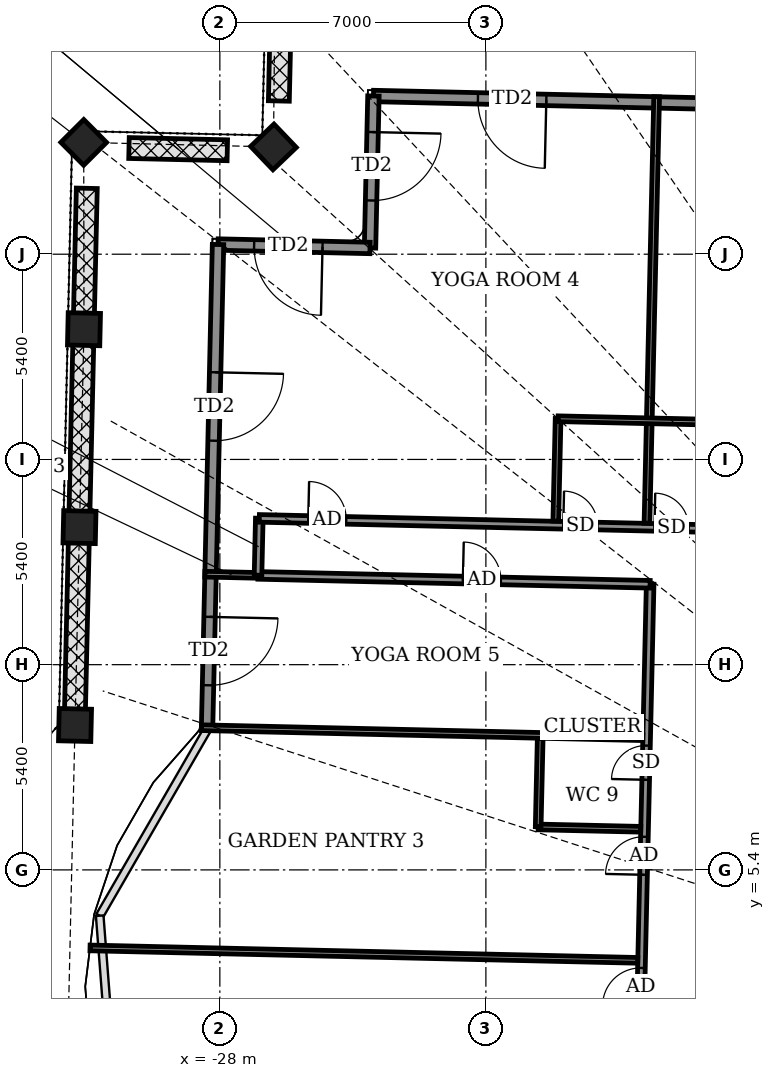
"""IFC4 building model, lengths in metres.
Left out: names, types, materials, properties, quantities, classifications, styles, units other than length and angle.
Written with IfcOpenShell. Run it as: python <this file> out.ifc"""

import sys

from ifc_helpers import new_model, si_unit, direction, frame, frame_2d, origin, origin_2d, place, context, subcontext, project, spatial, rectangle, extrude, element, fill, save


model = new_model("IFC4")
c1 = context("Model", 3, precision=1e-05, world=origin(), true_north=direction((0.0, 1.0)))
c2 = subcontext(c1, "Body", "Model", "MODEL_VIEW")
j1 = project(units=[si_unit("LENGTHUNIT", "METRE"), si_unit("PLANEANGLEUNIT", "RADIAN")], contexts=[c1])
p1 = place(None, origin())
s1 = spatial("IfcSite", under=j1, at=p1, CompositionType="ELEMENT")
p2 = place(p1, origin())
s2 = spatial("IfcBuilding", under=s1, at=p2, CompositionType="ELEMENT")
p3 = place(p2, frame((0.0, 0.0, 329.7)))
s3 = spatial("IfcBuildingStorey", under=s2, at=p3, CompositionType="ELEMENT", Elevation=329.7)
for number, where, z_axis, x_axis in (
    (1, (-26.589, 24.423, -0.55), (0.0, 0.0, 1.0), (-0.723, -0.691, 0.0)),
    (2, (-31.582, 24.542, -0.55), (0.0, 0.0, 1.0), (-0.709, -0.706, 0.0)),
    (3, (-31.575, 19.626, -0.55), (0.0, 0.0, 1.0), (-0.023, -1.0, 0.0)),
    (4, (-31.693, 14.419, -0.55), (0.0, 0.0, 1.0), (-0.023, -1.0, 0.0)),
    (5, (-31.811, 9.212, -0.55), (0.0, 0.0, 1.0), (-0.023, -1.0, 0.0)),
):
    element("IfcColumn", number, at=place(p3, frame(where, z_axis=z_axis, x_axis=x_axis)), inside=s3, PredefinedType="COLUMN", context=c2, shape_type="SweptSolid", body=[
        extrude(rectangle(XDim=0.85, YDim=0.85, at=origin_2d()), origin(), (0.0, 0.0, 1.0), 4.6),
    ])
p4 = place(p3, frame((23.279, 24.691, 0.0), z_axis=(0.0, 0.0, 1.0), x_axis=(-0.9997425899, 0.022688189451, 0.0)))
e6 = element("IfcWall", 6, at=p4, inside=s3, PredefinedType="SOLIDWALL", context=c2, shape_type="SweptSolid", body=[
    extrude(rectangle(XDim=47.25, YDim=0.3, at=frame_2d((23.625, 0.0))), origin(), (0.0, 0.0, 1.0), 2.1),
])
p5 = place(p4, frame((3.2, 0.0, 0.0)))
e7 = element("IfcOpeningElement", 7, at=p5, cuts=e6, PredefinedType="OPENING", context=c2, shape_type="SweptSolid", body=[
    extrude(rectangle(XDim=1.8, YDim=2.0, at=frame_2d((0.9, 1.0))), frame((0.0, 0.16, 0.0), z_axis=(0.0, -1.0, 0.0), x_axis=(1.0, 0.0, 0.0)), (0.0, 0.0, 1.0), 0.32),
])
p6 = place(p4, frame((10.45, 0.0, 0.0)))
e8 = element("IfcOpeningElement", 8, at=p6, cuts=e6, PredefinedType="OPENING", context=c2, shape_type="SweptSolid", body=[
    extrude(rectangle(XDim=1.8, YDim=2.0, at=frame_2d((0.9, 1.0))), frame((0.0, 0.16, 0.0), z_axis=(0.0, -1.0, 0.0), x_axis=(1.0, 0.0, 0.0)), (0.0, 0.0, 1.0), 0.32),
])
p7 = place(p4, frame((17.7, 0.0, 0.0)))
e9 = element("IfcOpeningElement", 9, at=p7, cuts=e6, PredefinedType="OPENING", context=c2, shape_type="SweptSolid", body=[
    extrude(rectangle(XDim=1.8, YDim=2.0, at=frame_2d((0.9, 1.0))), frame((0.0, 0.16, 0.0), z_axis=(0.0, -1.0, 0.0), x_axis=(1.0, 0.0, 0.0)), (0.0, 0.0, 1.0), 0.32),
])
p8 = place(p4, frame((28.3, 0.0, 0.0)))
e10 = element("IfcOpeningElement", 10, at=p8, cuts=e6, PredefinedType="OPENING", context=c2, shape_type="SweptSolid", body=[
    extrude(rectangle(XDim=1.8, YDim=2.0, at=frame_2d((0.9, 1.0))), frame((0.0, 0.16, 0.0), z_axis=(0.0, -1.0, 0.0), x_axis=(1.0, 0.0, 0.0)), (0.0, 0.0, 1.0), 0.32),
])
p9 = place(p4, frame((35.125, 0.0, 0.0)))
e11 = element("IfcOpeningElement", 11, at=p9, cuts=e6, PredefinedType="OPENING", context=c2, shape_type="SweptSolid", body=[
    extrude(rectangle(XDim=1.8, YDim=2.0, at=frame_2d((0.9, 1.0))), frame((0.0, 0.16, 0.0), z_axis=(0.0, -1.0, 0.0), x_axis=(1.0, 0.0, 0.0)), (0.0, 0.0, 1.0), 0.32),
])
p10 = place(p4, frame((42.7, 0.0, 0.0)))
e12 = element("IfcOpeningElement", 12, at=p10, cuts=e6, PredefinedType="OPENING", context=c2, shape_type="SweptSolid", body=[
    extrude(rectangle(XDim=1.8, YDim=2.0, at=frame_2d((0.9, 1.0))), frame((0.0, 0.16, 0.0), z_axis=(0.0, -1.0, 0.0), x_axis=(1.0, 0.0, 0.0)), (0.0, 0.0, 1.0), 0.32),
])
p11 = place(p3, frame((-23.959, 25.763, 0.0), z_axis=(0.0, 0.0, 1.0), x_axis=(-0.022521758502, -0.999746353029, 0.0)))
e13 = element("IfcWall", 13, at=p11, inside=s3, PredefinedType="SOLIDWALL", context=c2, shape_type="SweptSolid", body=[
    extrude(rectangle(XDim=4.0, YDim=0.3, at=frame_2d((2.0, 0.0))), origin(), (0.0, 0.0, 1.0), 2.1),
])
p12 = place(p11, frame((0.95, 0.0, 0.0)))
e14 = element("IfcOpeningElement", 14, at=p12, cuts=e13, PredefinedType="OPENING", context=c2, shape_type="SweptSolid", body=[
    extrude(rectangle(XDim=1.8, YDim=2.0, at=frame_2d((0.9, 1.0))), frame((0.0, 0.16, 0.0), z_axis=(0.0, -1.0, 0.0), x_axis=(1.0, 0.0, 0.0)), (0.0, 0.0, 1.0), 0.32),
])
p13 = place(p3, frame((-24.049, 21.764, 0.0), z_axis=(0.0, 0.0, 1.0), x_axis=(-0.999740826251, 0.022765770952, 0.0)))
e15 = element("IfcWall", 15, at=p13, inside=s3, PredefinedType="SOLIDWALL", context=c2, shape_type="SweptSolid", body=[
    extrude(rectangle(XDim=4.0, YDim=0.3, at=frame_2d((2.0, 0.0))), origin(), (0.0, 0.0, 1.0), 2.1),
])
p14 = place(p13, frame((1.25, 0.0, 0.0)))
e16 = element("IfcOpeningElement", 16, at=p14, cuts=e15, PredefinedType="OPENING", context=c2, shape_type="SweptSolid", body=[
    extrude(rectangle(XDim=1.8, YDim=2.0, at=frame_2d((0.9, 1.0))), frame((0.0, 0.16, 0.0), z_axis=(0.0, -1.0, 0.0), x_axis=(1.0, 0.0, 0.0)), (0.0, 0.0, 1.0), 0.32),
])
p15 = place(p3, frame((-28.048, 21.855, 0.0), z_axis=(0.0, 0.0, 1.0), x_axis=(-0.022677140298, -0.999742840588, 0.0)))
e17 = element("IfcWall", 17, at=p15, inside=s3, PredefinedType="SOLIDWALL", context=c2, shape_type="SweptSolid", body=[
    extrude(rectangle(XDim=12.779, YDim=0.3, at=frame_2d((6.39, 0.0))), origin(), (0.0, 0.0, 1.0), 2.1),
])
p16 = place(p15, frame((3.363, 0.0, 0.0)))
e18 = element("IfcOpeningElement", 18, at=p16, cuts=e17, PredefinedType="OPENING", context=c2, shape_type="SweptSolid", body=[
    extrude(rectangle(XDim=1.8, YDim=2.0, at=frame_2d((0.9, 1.0))), frame((0.0, 0.16, 0.0), z_axis=(0.0, -1.0, 0.0), x_axis=(1.0, 0.0, 0.0)), (0.0, 0.0, 1.0), 0.32),
])
p17 = place(p15, frame((9.8, 0.0, 0.0)))
e19 = element("IfcOpeningElement", 19, at=p17, cuts=e17, PredefinedType="OPENING", context=c2, shape_type="SweptSolid", body=[
    extrude(rectangle(XDim=1.8, YDim=2.0, at=frame_2d((0.9, 1.0))), frame((0.0, 0.16, 0.0), z_axis=(0.0, -1.0, 0.0), x_axis=(1.0, 0.0, 0.0)), (0.0, 0.0, 1.0), 0.32),
])
p18 = place(p3, frame((-31.813, 9.575, 0.0), z_axis=(0.0, 0.0, 1.0), x_axis=(0.022671035137, 0.999742979053, 0.0)))
e20 = element("IfcWall", 20, at=p18, inside=s3, PredefinedType="USERDEFINED", context=c2, shape_type="SweptSolid", body=[
    extrude(rectangle(XDim=13.762, YDim=0.55, at=frame_2d((6.881, 0.0))), origin(), (0.0, 0.0, 1.0), 0.8),
])
p19 = place(p3, frame((-30.391, 24.394, 0.0), z_axis=(0.0, 0.0, 1.0), x_axis=(0.999739345612, -0.022830699409, 0.0)))
e21 = element("IfcWall", 21, at=p19, inside=s3, PredefinedType="USERDEFINED", context=c2, shape_type="SweptSolid", body=[
    extrude(rectangle(XDim=2.588, YDim=0.55, at=frame_2d((1.294, 0.0))), origin(), (0.0, 0.0, 1.0), 0.8),
])
p20 = place(p3, frame((-26.448, 25.632, 0.0), z_axis=(0.0, 0.0, 1.0), x_axis=(0.022898430909, 0.999737796556, 0.0)))
e22 = element("IfcWall", 22, at=p20, inside=s3, PredefinedType="USERDEFINED", context=c2, shape_type="SweptSolid", body=[
    extrude(rectangle(XDim=2.538, YDim=0.55, at=frame_2d((1.269, 0.0))), origin(), (0.0, 0.0, 1.0), 0.8),
])
p21 = place(p3, frame((-17.247, -12.149, 0.0), z_axis=(0.0, 0.0, 1.0), x_axis=(0.022696191528, 0.999742408268, 0.0)))
e23 = element("IfcWall", 23, at=p21, inside=s3, PredefinedType="PARTITIONING", context=c2, shape_type="SweptSolid", body=[
    extrude(rectangle(XDim=25.074, YDim=0.2, at=frame_2d((12.537, 0.0))), origin(), (0.0, 0.0, 1.0), 2.1),
])
p22 = place(p21, frame((17.425, 0.0, 0.0)))
e24 = element("IfcOpeningElement", 24, at=p22, cuts=e23, PredefinedType="OPENING", context=c2, shape_type="SweptSolid", body=[
    extrude(rectangle(XDim=1.0, YDim=2.1, at=frame_2d((0.5, 1.05))), frame((0.0, 0.11, 0.0), z_axis=(0.0, -1.0, 0.0), x_axis=(1.0, 0.0, 0.0)), (0.0, 0.0, 1.0), 0.22),
])
p23 = place(p21, frame((19.925, 0.0, 0.0)))
e25 = element("IfcOpeningElement", 25, at=p23, cuts=e23, PredefinedType="OPENING", context=c2, shape_type="SweptSolid", body=[
    extrude(rectangle(XDim=0.9, YDim=2.1, at=frame_2d((0.45, 1.05))), frame((0.0, 0.11, 0.0), z_axis=(0.0, -1.0, 0.0), x_axis=(1.0, 0.0, 0.0)), (0.0, 0.0, 1.0), 0.22),
])
p24 = place(p21, frame((13.973, 0.0, 0.0)))
e26 = element("IfcOpeningElement", 26, at=p24, cuts=e23, PredefinedType="OPENING", context=c2, shape_type="SweptSolid", body=[
    extrude(rectangle(XDim=1.0, YDim=2.1, at=frame_2d((0.5, 1.05))), frame((0.0, 0.11, 0.0), z_axis=(0.0, -1.0, 0.0), x_axis=(1.0, 0.0, 0.0)), (0.0, 0.0, 1.0), 0.22),
])
p25 = place(p21, frame((8.575, 0.0, 0.0)))
e27 = element("IfcOpeningElement", 27, at=p25, cuts=e23, PredefinedType="OPENING", context=c2, shape_type="SweptSolid", body=[
    extrude(rectangle(XDim=0.9, YDim=2.1, at=frame_2d((0.45, 1.05))), frame((0.0, 0.11, 0.0), z_axis=(0.0, -1.0, 0.0), x_axis=(1.0, 0.0, 0.0)), (0.0, 0.0, 1.0), 0.22),
])
p26 = place(p21, frame((6.175, 0.0, 0.0)))
e28 = element("IfcOpeningElement", 28, at=p26, cuts=e23, PredefinedType="OPENING", context=c2, shape_type="SweptSolid", body=[
    extrude(rectangle(XDim=0.9, YDim=2.1, at=frame_2d((0.45, 1.05))), frame((0.0, 0.11, 0.0), z_axis=(0.0, -1.0, 0.0), x_axis=(1.0, 0.0, 0.0)), (0.0, 0.0, 1.0), 0.22),
])
p27 = place(p3, frame((-31.416, 3.347, 0.0), z_axis=(0.0, 0.0, 1.0), x_axis=(0.999742848762, -0.022676779958, 0.0)))
e29 = element("IfcWall", 29, at=p27, inside=s3, PredefinedType="PARTITIONING", context=c2, shape_type="SweptSolid", body=[
    extrude(rectangle(XDim=14.416, YDim=0.15, at=frame_2d((7.208, 0.0))), origin(), (0.0, 0.0, 1.0), 2.55),
])
p28 = place(p3, frame((-19.625, 6.53, 0.0), z_axis=(0.0, 0.0, 1.0), x_axis=(0.999744396973, -0.02260842146, 0.0)))
e30 = element("IfcWall", 30, at=p28, inside=s3, PredefinedType="PARTITIONING", context=c2, shape_type="SweptSolid", body=[
    extrude(rectangle(XDim=2.7, YDim=0.15, at=frame_2d((1.35, 0.0))), origin(), (0.0, 0.0, 1.0), 2.25),
])
p29 = place(p3, frame((-19.624, 6.535, 0.0), z_axis=(0.0, 0.0, 1.0), x_axis=(0.022778632478, 0.99974053329, 0.0)))
e31 = element("IfcWall", 31, at=p29, inside=s3, PredefinedType="PARTITIONING", context=c2, shape_type="SweptSolid", body=[
    extrude(rectangle(XDim=2.326, YDim=0.15, at=frame_2d((1.163, 0.0))), origin(), (0.0, 0.0, 1.0), 2.25),
])
p30 = place(p3, frame((-28.487, 9.142, 0.0), z_axis=(0.0, 0.0, 1.0), x_axis=(0.999741520862, -0.02273524718, 0.0)))
e32 = element("IfcWall", 32, at=p30, inside=s3, PredefinedType="PARTITIONING", context=c2, shape_type="SweptSolid", body=[
    extrude(rectangle(XDim=11.619, YDim=0.15, at=frame_2d((5.81, 0.0))), origin(), (0.0, 0.0, 1.0), 2.15),
])
p31 = place(p3, frame((-28.395, 13.181, 0.0), z_axis=(0.0, 0.0, 1.0), x_axis=(0.999740306547, -0.022788581896, 0.0)))
e33 = element("IfcWall", 33, at=p31, inside=s3, PredefinedType="PARTITIONING", context=c2, shape_type="SweptSolid", body=[
    extrude(rectangle(XDim=1.403, YDim=0.15, at=frame_2d((0.702, 0.0))), origin(), (0.0, 0.0, 1.0), 4.05),
])
p32 = place(p3, frame((-26.996, 13.149, 0.0), z_axis=(0.0, 0.0, 1.0), x_axis=(0.999743140734, -0.022663904229, 0.0)))
e34 = element("IfcWall", 34, at=p32, inside=s3, PredefinedType="PARTITIONING", context=c2, shape_type="SweptSolid", body=[
    extrude(rectangle(XDim=10.32, YDim=0.2, at=frame_2d((5.16, 0.0))), origin(), (0.0, 0.0, 1.0), 2.1),
])
p33 = place(p32, frame((5.392, 0.0, 0.0)))
e35 = element("IfcOpeningElement", 35, at=p33, cuts=e34, PredefinedType="OPENING", context=c2, shape_type="SweptSolid", body=[
    extrude(rectangle(XDim=1.0, YDim=2.1, at=frame_2d((0.5, 1.05))), frame((0.0, 0.11, 0.0), z_axis=(0.0, -1.0, 0.0), x_axis=(1.0, 0.0, 0.0)), (0.0, 0.0, 1.0), 0.22),
])
p34 = place(p3, frame((-26.996, 13.153, 0.0), z_axis=(0.0, 0.0, 1.0), x_axis=(0.022780545013, 0.999740489712, 0.0)))
e36 = element("IfcWall", 36, at=p34, inside=s3, PredefinedType="PARTITIONING", context=c2, shape_type="SweptSolid", body=[
    extrude(rectangle(XDim=1.5, YDim=0.2, at=frame_2d((0.75, 0.0))), origin(), (0.0, 0.0, 1.0), 2.15),
])
p35 = place(p3, frame((-26.962, 14.649, 0.0), z_axis=(0.0, 0.0, 1.0), x_axis=(0.999742499365, -0.022692178484, 0.0)))
e37 = element("IfcWall", 37, at=p35, inside=s3, PredefinedType="PARTITIONING", context=c2, shape_type="SweptSolid", body=[
    extrude(rectangle(XDim=52.75, YDim=0.2, at=frame_2d((26.375, 0.0))), origin(), (0.0, 0.0, 1.0), 2.1),
])
p36 = place(p35, frame((47.426, 0.0, 0.0)))
e38 = element("IfcOpeningElement", 38, at=p36, cuts=e37, PredefinedType="OPENING", context=c2, shape_type="SweptSolid", body=[
    extrude(rectangle(XDim=1.0, YDim=2.1, at=frame_2d((0.5, 1.05))), frame((0.0, 0.11, 0.0), z_axis=(0.0, -1.0, 0.0), x_axis=(1.0, 0.0, 0.0)), (0.0, 0.0, 1.0), 0.22),
])
p37 = place(p35, frame((41.85, 0.0, 0.0)))
e39 = element("IfcOpeningElement", 39, at=p37, cuts=e37, PredefinedType="OPENING", context=c2, shape_type="SweptSolid", body=[
    extrude(rectangle(XDim=0.9, YDim=2.1, at=frame_2d((0.45, 1.05))), frame((0.0, 0.11, 0.0), z_axis=(0.0, -1.0, 0.0), x_axis=(1.0, 0.0, 0.0)), (0.0, 0.0, 1.0), 0.22),
])
p38 = place(p35, frame((36.824, 0.0, 0.0)))
e40 = element("IfcOpeningElement", 40, at=p38, cuts=e37, PredefinedType="OPENING", context=c2, shape_type="SweptSolid", body=[
    extrude(rectangle(XDim=1.0, YDim=2.1, at=frame_2d((0.5, 1.05))), frame((0.0, 0.11, 0.0), z_axis=(0.0, -1.0, 0.0), x_axis=(1.0, 0.0, 0.0)), (0.0, 0.0, 1.0), 0.22),
])
p39 = place(p35, frame((28.436, 0.0, 0.0)))
e41 = element("IfcOpeningElement", 41, at=p39, cuts=e37, PredefinedType="OPENING", context=c2, shape_type="SweptSolid", body=[
    extrude(rectangle(XDim=1.0, YDim=2.1, at=frame_2d((0.5, 1.05))), frame((0.0, 0.11, 0.0), z_axis=(0.0, -1.0, 0.0), x_axis=(1.0, 0.0, 0.0)), (0.0, 0.0, 1.0), 0.22),
])
p40 = place(p35, frame((33.45, 0.0, 0.0)))
e42 = element("IfcOpeningElement", 42, at=p40, cuts=e37, PredefinedType="OPENING", context=c2, shape_type="SweptSolid", body=[
    extrude(rectangle(XDim=0.9, YDim=2.1, at=frame_2d((0.45, 1.05))), frame((0.0, 0.11, 0.0), z_axis=(0.0, -1.0, 0.0), x_axis=(1.0, 0.0, 0.0)), (0.0, 0.0, 1.0), 0.22),
])
p41 = place(p35, frame((24.05, 0.0, 0.0)))
e43 = element("IfcOpeningElement", 43, at=p41, cuts=e37, PredefinedType="OPENING", context=c2, shape_type="SweptSolid", body=[
    extrude(rectangle(XDim=1.0, YDim=2.1, at=frame_2d((0.5, 1.05))), frame((0.0, 0.11, 0.0), z_axis=(0.0, -1.0, 0.0), x_axis=(1.0, 0.0, 0.0)), (0.0, 0.0, 1.0), 0.22),
])
p42 = place(p35, frame((17.95, 0.0, 0.0)))
e44 = element("IfcOpeningElement", 44, at=p42, cuts=e37, PredefinedType="OPENING", context=c2, shape_type="SweptSolid", body=[
    extrude(rectangle(XDim=1.0, YDim=2.1, at=frame_2d((0.5, 1.05))), frame((0.0, 0.11, 0.0), z_axis=(0.0, -1.0, 0.0), x_axis=(1.0, 0.0, 0.0)), (0.0, 0.0, 1.0), 0.22),
])
p43 = place(p35, frame((21.65, 0.0, 0.0)))
e45 = element("IfcOpeningElement", 45, at=p43, cuts=e37, PredefinedType="OPENING", context=c2, shape_type="SweptSolid", body=[
    extrude(rectangle(XDim=0.9, YDim=2.1, at=frame_2d((0.45, 1.05))), frame((0.0, 0.11, 0.0), z_axis=(0.0, -1.0, 0.0), x_axis=(1.0, 0.0, 0.0)), (0.0, 0.0, 1.0), 0.22),
])
p44 = place(p35, frame((13.314, 0.0, 0.0)))
e46 = element("IfcOpeningElement", 46, at=p44, cuts=e37, PredefinedType="OPENING", context=c2, shape_type="SweptSolid", body=[
    extrude(rectangle(XDim=1.0, YDim=2.1, at=frame_2d((0.5, 1.05))), frame((0.0, 0.11, 0.0), z_axis=(0.0, -1.0, 0.0), x_axis=(1.0, 0.0, 0.0)), (0.0, 0.0, 1.0), 0.22),
])
p45 = place(p35, frame((10.4, 0.0, 0.0)))
e47 = element("IfcOpeningElement", 47, at=p45, cuts=e37, PredefinedType="OPENING", context=c2, shape_type="SweptSolid", body=[
    extrude(rectangle(XDim=0.9, YDim=2.1, at=frame_2d((0.45, 1.05))), frame((0.0, 0.11, 0.0), z_axis=(0.0, -1.0, 0.0), x_axis=(1.0, 0.0, 0.0)), (0.0, 0.0, 1.0), 0.22),
])
p46 = place(p35, frame((1.288, 0.0, 0.0)))
e48 = element("IfcOpeningElement", 48, at=p46, cuts=e37, PredefinedType="OPENING", context=c2, shape_type="SweptSolid", body=[
    extrude(rectangle(XDim=1.0, YDim=2.1, at=frame_2d((0.5, 1.05))), frame((0.0, 0.11, 0.0), z_axis=(0.0, -1.0, 0.0), x_axis=(1.0, 0.0, 0.0)), (0.0, 0.0, 1.0), 0.22),
])
p47 = place(p35, frame((8.0, 0.0, 0.0)))
e49 = element("IfcOpeningElement", 49, at=p47, cuts=e37, PredefinedType="OPENING", context=c2, shape_type="SweptSolid", body=[
    extrude(rectangle(XDim=0.9, YDim=2.1, at=frame_2d((0.45, 1.05))), frame((0.0, 0.11, 0.0), z_axis=(0.0, -1.0, 0.0), x_axis=(1.0, 0.0, 0.0)), (0.0, 0.0, 1.0), 0.22),
])
p48 = place(p3, frame((-19.161, 14.576, 0.0), z_axis=(0.0, 0.0, 1.0), x_axis=(0.022518033722, 0.999746436932, 0.0)))
e50 = element("IfcWall", 50, at=p48, inside=s3, PredefinedType="PARTITIONING", context=c2, shape_type="SweptSolid", body=[
    extrude(rectangle(XDim=2.7, YDim=0.15, at=frame_2d((1.35, 0.0))), origin(), (0.0, 0.0, 1.0), 2.1),
])
p49 = place(p3, frame((-16.762, 14.521, 0.0), z_axis=(0.0, 0.0, 1.0), x_axis=(0.022705102634, 0.999742205928, 0.0)))
e51 = element("IfcWall", 51, at=p49, inside=s3, PredefinedType="PARTITIONING", context=c2, shape_type="SweptSolid", body=[
    extrude(rectangle(XDim=11.226, YDim=0.15, at=frame_2d((5.613, 0.0))), origin(), (0.0, 0.0, 1.0), 2.1),
])
p50 = place(p3, frame((-19.1, 17.271, 0.0), z_axis=(0.0, 0.0, 1.0), x_axis=(0.999742701292, -0.022683280499, 0.0)))
e52 = element("IfcWall", 52, at=p50, inside=s3, PredefinedType="PARTITIONING", context=c2, shape_type="SweptSolid", body=[
    extrude(rectangle(XDim=4.8, YDim=0.15, at=frame_2d((2.4, 0.0))), origin(), (0.0, 0.0, 1.0), 2.1),
])
p51 = place(p10, origin())
e53 = element("IfcDoor", 53, at=p51, inside=s3, OperationType="DOUBLE_DOOR_SINGLE_SWING", PredefinedType="DOOR", context=c2, shape_type="SweptSolid", body=[
    extrude(rectangle(XDim=1.8, YDim=2.0, at=frame_2d((0.9, 1.0))), frame((0.0, 0.025, 0.0), z_axis=(0.0, -1.0, 0.0), x_axis=(1.0, 0.0, 0.0)), (0.0, 0.0, 1.0), 0.05),
])
fill(e12, e53)
p52 = place(p12, origin())
e54 = element("IfcDoor", 54, at=p52, inside=s3, OperationType="DOUBLE_DOOR_SINGLE_SWING", PredefinedType="DOOR", context=c2, shape_type="SweptSolid", body=[
    extrude(rectangle(XDim=1.8, YDim=2.0, at=frame_2d((0.9, 1.0))), frame((0.0, 0.025, 0.0), z_axis=(0.0, -1.0, 0.0), x_axis=(1.0, 0.0, 0.0)), (0.0, 0.0, 1.0), 0.05),
])
fill(e14, e54)
p53 = place(p14, origin())
e55 = element("IfcDoor", 55, at=p53, inside=s3, OperationType="DOUBLE_DOOR_SINGLE_SWING", PredefinedType="DOOR", context=c2, shape_type="SweptSolid", body=[
    extrude(rectangle(XDim=1.8, YDim=2.0, at=frame_2d((0.9, 1.0))), frame((0.0, 0.025, 0.0), z_axis=(0.0, -1.0, 0.0), x_axis=(1.0, 0.0, 0.0)), (0.0, 0.0, 1.0), 0.05),
])
fill(e16, e55)
p54 = place(p16, origin())
e56 = element("IfcDoor", 56, at=p54, inside=s3, OperationType="DOUBLE_DOOR_SINGLE_SWING", PredefinedType="DOOR", context=c2, shape_type="SweptSolid", body=[
    extrude(rectangle(XDim=1.8, YDim=2.0, at=frame_2d((0.9, 1.0))), frame((0.0, 0.025, 0.0), z_axis=(0.0, -1.0, 0.0), x_axis=(1.0, 0.0, 0.0)), (0.0, 0.0, 1.0), 0.05),
])
fill(e18, e56)
p55 = place(p17, origin())
e57 = element("IfcDoor", 57, at=p55, inside=s3, OperationType="DOUBLE_DOOR_SINGLE_SWING", PredefinedType="DOOR", context=c2, shape_type="SweptSolid", body=[
    extrude(rectangle(XDim=1.8, YDim=2.0, at=frame_2d((0.9, 1.0))), frame((0.0, 0.025, 0.0), z_axis=(0.0, -1.0, 0.0), x_axis=(1.0, 0.0, 0.0)), (0.0, 0.0, 1.0), 0.05),
])
fill(e19, e57)
p56 = place(p45, origin())
e58 = element("IfcDoor", 58, at=p56, inside=s3, OperationType="SINGLE_SWING_LEFT", PredefinedType="DOOR", context=c2, shape_type="SweptSolid", body=[
    extrude(rectangle(XDim=0.9, YDim=2.1, at=frame_2d((0.45, 1.05))), frame((0.0, 0.025, 0.0), z_axis=(0.0, -1.0, 0.0), x_axis=(1.0, 0.0, 0.0)), (0.0, 0.0, 1.0), 0.05),
])
fill(e47, e58)
p57 = place(p46, origin())
e59 = element("IfcDoor", 59, at=p57, inside=s3, OperationType="SINGLE_SWING_RIGHT", PredefinedType="DOOR", context=c2, shape_type="SweptSolid", body=[
    extrude(rectangle(XDim=1.0, YDim=2.1, at=frame_2d((0.5, 1.05))), frame((0.0, 0.025, 0.0), z_axis=(0.0, -1.0, 0.0), x_axis=(1.0, 0.0, 0.0)), (0.0, 0.0, 1.0), 0.05),
])
fill(e48, e59)
p58 = place(p47, origin())
e60 = element("IfcDoor", 60, at=p58, inside=s3, OperationType="SINGLE_SWING_RIGHT", PredefinedType="DOOR", context=c2, shape_type="SweptSolid", body=[
    extrude(rectangle(XDim=0.9, YDim=2.1, at=frame_2d((0.45, 1.05))), frame((0.0, 0.025, 0.0), z_axis=(0.0, -1.0, 0.0), x_axis=(1.0, 0.0, 0.0)), (0.0, 0.0, 1.0), 0.05),
])
fill(e49, e60)
p59 = place(p33, origin())
e61 = element("IfcDoor", 61, at=p59, inside=s3, OperationType="SINGLE_SWING_LEFT", PredefinedType="DOOR", context=c2, shape_type="SweptSolid", body=[
    extrude(rectangle(XDim=1.0, YDim=2.1, at=frame_2d((0.5, 1.05))), frame((0.0, 0.025, 0.0), z_axis=(0.0, -1.0, 0.0), x_axis=(1.0, 0.0, 0.0)), (0.0, 0.0, 1.0), 0.05),
])
fill(e35, e61)
p60 = place(p22, origin())
e62 = element("IfcDoor", 62, at=p60, inside=s3, OperationType="SINGLE_SWING_RIGHT", PredefinedType="DOOR", context=c2, shape_type="SweptSolid", body=[
    extrude(rectangle(XDim=1.0, YDim=2.1, at=frame_2d((0.5, 1.05))), frame((0.0, 0.025, 0.0), z_axis=(0.0, -1.0, 0.0), x_axis=(1.0, 0.0, 0.0)), (0.0, 0.0, 1.0), 0.05),
])
fill(e24, e62)
p61 = place(p23, origin())
e63 = element("IfcDoor", 63, at=p61, inside=s3, OperationType="SINGLE_SWING_LEFT", PredefinedType="DOOR", context=c2, shape_type="SweptSolid", body=[
    extrude(rectangle(XDim=0.9, YDim=2.1, at=frame_2d((0.45, 1.05))), frame((0.0, 0.025, 0.0), z_axis=(0.0, -1.0, 0.0), x_axis=(1.0, 0.0, 0.0)), (0.0, 0.0, 1.0), 0.05),
])
fill(e25, e63)
p62 = place(p24, origin())
e64 = element("IfcDoor", 64, at=p62, inside=s3, OperationType="SINGLE_SWING_LEFT", PredefinedType="DOOR", context=c2, shape_type="SweptSolid", body=[
    extrude(rectangle(XDim=1.0, YDim=2.1, at=frame_2d((0.5, 1.05))), frame((0.0, 0.025, 0.0), z_axis=(0.0, -1.0, 0.0), x_axis=(1.0, 0.0, 0.0)), (0.0, 0.0, 1.0), 0.05),
])
fill(e26, e64)
save(model, sys.argv[1])
